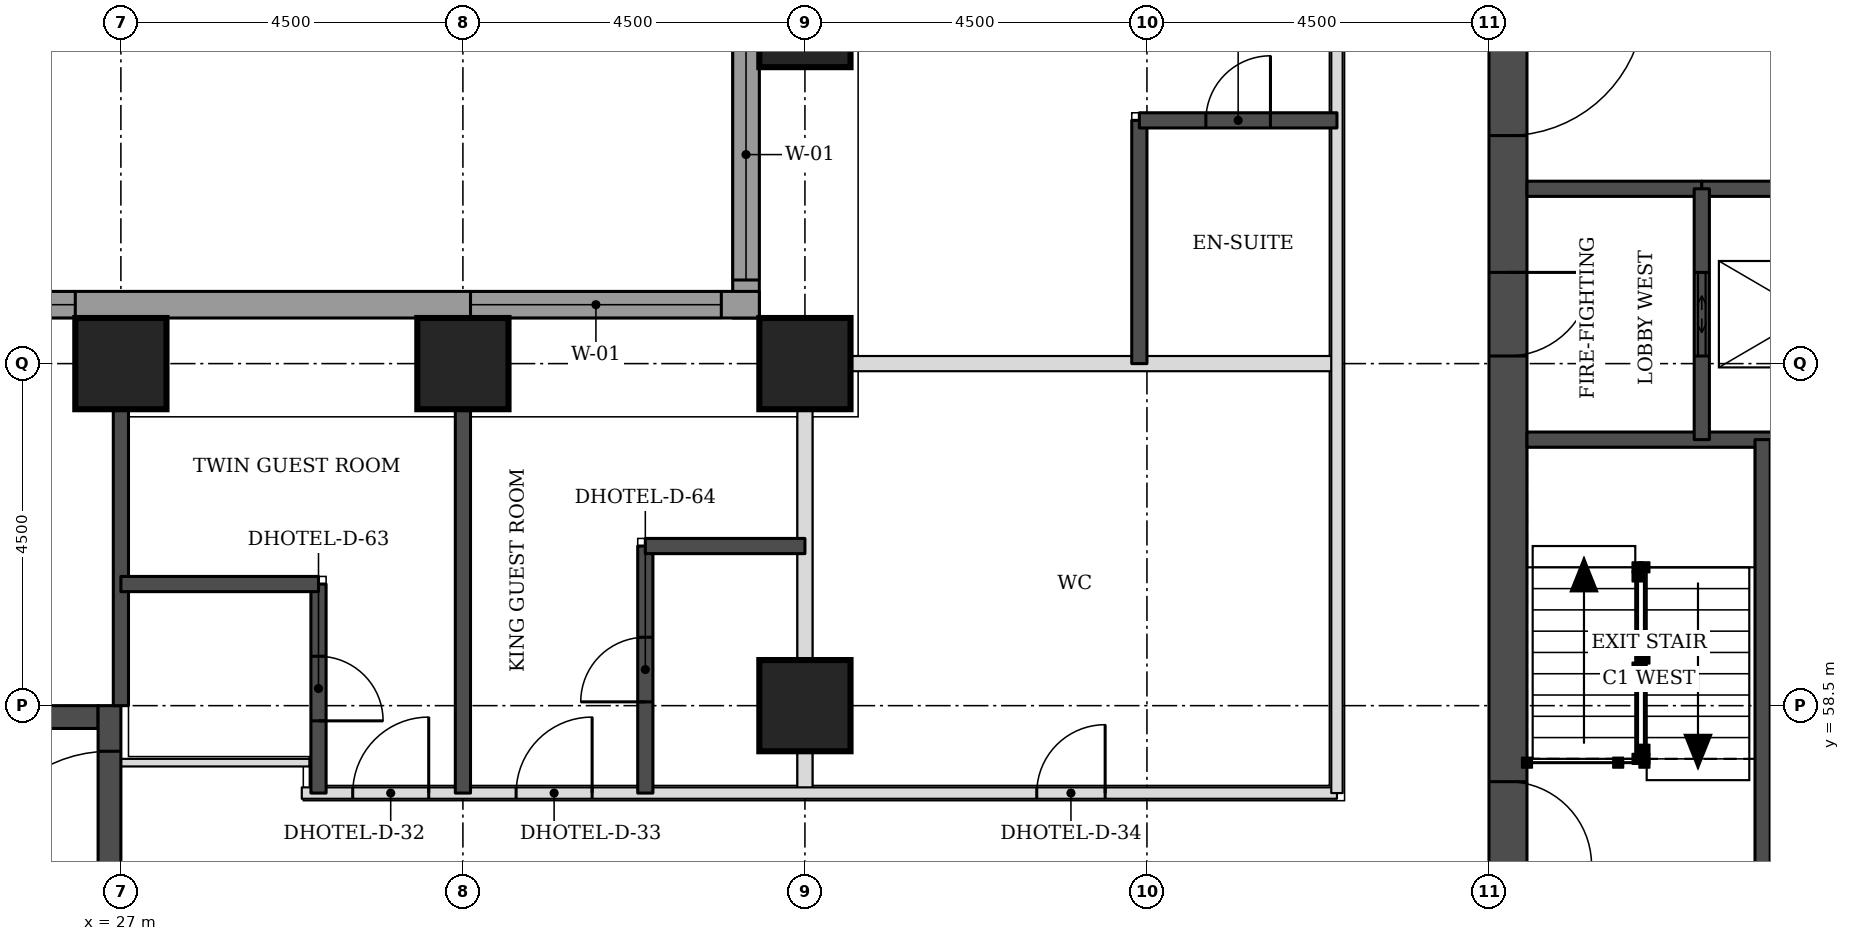
"""IFC4 building model, lengths in metres.
Left out: names, types, materials, properties, quantities, classifications, styles, units other than length and angle.
Written with IfcOpenShell. Run it as: python <this file> out.ifc"""

import sys

from ifc_helpers import new_model, si_unit, direction, frame, frame_2d, origin, origin_2d, place, context, subcontext, project, spatial, rectangle, extrude, element, fill, save


model = new_model("IFC4")
c1 = context("Model", 3, precision=1e-05, world=origin(), true_north=direction((0.0, 1.0)))
c2 = subcontext(c1, "Body", "Model", "MODEL_VIEW")
j1 = project(units=[si_unit("LENGTHUNIT", "METRE"), si_unit("PLANEANGLEUNIT", "RADIAN")], contexts=[c1])
p1 = place(None, origin())
s1 = spatial("IfcSite", under=j1, at=p1, CompositionType="ELEMENT")
p2 = place(p1, origin())
s2 = spatial("IfcBuilding", under=s1, at=p2, CompositionType="ELEMENT")
p3 = place(p2, frame((0.0, 0.0, 59.4)))
s3 = spatial("IfcBuildingStorey", under=s2, at=p3, CompositionType="ELEMENT", Elevation=59.4)
for number, where, z_axis, x_axis in (
    (1, (36.0, 58.5, 0.0), (0.0, 0.0, 1.0), (1.0, 0.0, 0.0)),
    (2, (27.0, 63.0, 0.0), (0.0, 0.0, 1.0), (1.0, 0.0, 0.0)),
    (3, (31.5, 63.0, 0.0), (0.0, 0.0, 1.0), (1.0, 0.0, 0.0)),
    (4, (36.0, 63.0, 0.0), (0.0, 0.0, 1.0), (1.0, 0.0, 0.0)),
    (5, (36.0, 67.5, 0.0), (0.0, 0.0, 1.0), (1.0, 0.0, 0.0)),
):
    element("IfcColumn", number, at=place(p3, frame(where, z_axis=z_axis, x_axis=x_axis)), inside=s3, PredefinedType="COLUMN", context=c2, shape_type="SweptSolid", body=[
        extrude(rectangle(XDim=1.2, YDim=1.2, at=origin_2d()), origin(), (0.0, 0.0, 1.0), 3.3),
    ])
p4 = place(p3, frame((45.25, 49.5, 0.0), z_axis=(0.0, 0.0, 1.0), x_axis=(0.0, 1.0, 0.0)))
e6 = element("IfcWall", 6, at=p4, inside=s3, PredefinedType="SHEAR", context=c2, shape_type="SweptSolid", body=[
    extrude(rectangle(XDim=22.5, YDim=0.5, at=frame_2d((11.25, 0.0))), origin(), (0.0, 0.0, 1.0), 3.3),
])
p5 = place(p4, frame((4.2, 0.0, 0.0)))
e7 = element("IfcOpeningElement", 7, at=p5, cuts=e6, PredefinedType="OPENING", context=c2, shape_type="SweptSolid", body=[
    extrude(rectangle(XDim=1.8, YDim=2.1, at=frame_2d((0.9, 1.05))), frame((0.0, 0.26, 0.0), z_axis=(0.0, -1.0, 0.0), x_axis=(1.0, 0.0, 0.0)), (0.0, 0.0, 1.0), 0.52),
])
p6 = place(p4, frame((6.9, 0.0, 0.0)))
e8 = element("IfcOpeningElement", 8, at=p6, cuts=e6, PredefinedType="OPENING", context=c2, shape_type="SweptSolid", body=[
    extrude(rectangle(XDim=1.1, YDim=2.1, at=frame_2d((0.55, 1.05))), frame((0.0, 0.26, 0.0), z_axis=(0.0, -1.0, 0.0), x_axis=(1.0, 0.0, 0.0)), (0.0, 0.0, 1.0), 0.52),
])
p7 = place(p4, frame((13.6, 0.0, 0.0)))
e9 = element("IfcOpeningElement", 9, at=p7, cuts=e6, PredefinedType="OPENING", context=c2, shape_type="SweptSolid", body=[
    extrude(rectangle(XDim=1.1, YDim=2.1, at=frame_2d((0.55, 1.05))), frame((0.0, 0.26, 0.0), z_axis=(0.0, -1.0, 0.0), x_axis=(1.0, 0.0, 0.0)), (0.0, 0.0, 1.0), 0.52),
])
p8 = place(p4, frame((16.5, 0.0, 0.0)))
e10 = element("IfcOpeningElement", 10, at=p8, cuts=e6, PredefinedType="OPENING", context=c2, shape_type="SweptSolid", body=[
    extrude(rectangle(XDim=1.8, YDim=2.1, at=frame_2d((0.9, 1.05))), frame((0.0, 0.26, 0.0), z_axis=(0.0, -1.0, 0.0), x_axis=(1.0, 0.0, 0.0)), (0.0, 0.0, 1.0), 0.52),
])
p9 = place(p3, frame((18.3, 58.35, 0.0), z_axis=(0.0, 0.0, 1.0), x_axis=(1.0, 0.0, 0.0)))
e11 = element("IfcWall", 11, at=p9, inside=s3, PredefinedType="SHEAR", context=c2, shape_type="SweptSolid", body=[
    extrude(rectangle(XDim=8.4, YDim=0.3, at=frame_2d((4.2, 0.0))), origin(), (0.0, 0.0, 1.0), 3.3),
])
p10 = place(p3, frame((26.85, 49.5, 0.0), z_axis=(0.0, 0.0, 1.0), x_axis=(0.0, 1.0, 0.0)))
e12 = element("IfcWall", 12, at=p10, inside=s3, PredefinedType="SHEAR", context=c2, shape_type="SweptSolid", body=[
    extrude(rectangle(XDim=9.0, YDim=0.3, at=frame_2d((4.5, 0.0))), origin(), (0.0, 0.0, 1.0), 3.3),
])
p11 = place(p10, frame((6.6, 0.0, 0.0)))
e13 = element("IfcOpeningElement", 13, at=p11, cuts=e12, PredefinedType="OPENING", context=c2, shape_type="SweptSolid", body=[
    extrude(rectangle(XDim=1.8, YDim=2.1, at=frame_2d((0.9, 1.05))), frame((0.0, 0.16, 0.0), z_axis=(0.0, -1.0, 0.0), x_axis=(1.0, 0.0, 0.0)), (0.0, 0.0, 1.0), 0.32),
])
p12 = place(p3, frame((35.225, 76.894, 0.0), z_axis=(0.0, 0.0, 1.0), x_axis=(0.0, -1.0, 0.0)))
e14 = element("IfcWall", 14, at=p12, inside=s3, PredefinedType="STANDARD", context=c2, shape_type="SweptSolid", body=[
    extrude(rectangle(XDim=13.293, YDim=0.35, at=frame_2d((6.647, 0.0))), origin(), (0.0, 0.0, 1.0), 3.055),
])
p13 = place(p12, frame((9.493, 0.0, 0.8)))
e15 = element("IfcOpeningElement", 15, at=p13, cuts=e14, PredefinedType="OPENING", context=c2, shape_type="SweptSolid", body=[
    extrude(rectangle(XDim=3.3, YDim=1.5, at=frame_2d((1.65, 0.75))), frame((0.0, 0.185, 0.0), z_axis=(0.0, -1.0, 0.0), x_axis=(1.0, 0.0, 0.0)), (0.0, 0.0, 1.0), 0.37),
])
p14 = place(p3, frame((35.4, 63.775, 0.0), z_axis=(0.0, 0.0, 1.0), x_axis=(-1.0, 0.0, 0.0)))
e16 = element("IfcWall", 16, at=p14, inside=s3, PredefinedType="STANDARD", context=c2, shape_type="SweptSolid", body=[
    extrude(rectangle(XDim=17.793, YDim=0.35, at=frame_2d((8.897, 0.0))), origin(), (0.0, 0.0, 1.0), 3.055),
])
p15 = place(p14, frame((0.5, 0.0, 0.8)))
e17 = element("IfcOpeningElement", 17, at=p15, cuts=e16, PredefinedType="OPENING", context=c2, shape_type="SweptSolid", body=[
    extrude(rectangle(XDim=3.3, YDim=1.5, at=frame_2d((1.65, 0.75))), frame((0.0, 0.185, 0.0), z_axis=(0.0, -1.0, 0.0), x_axis=(1.0, 0.0, 0.0)), (0.0, 0.0, 1.0), 0.37),
])
p16 = place(p14, frame((9.0, 0.0, 0.8)))
e18 = element("IfcOpeningElement", 18, at=p16, cuts=e16, PredefinedType="OPENING", context=c2, shape_type="SweptSolid", body=[
    extrude(rectangle(XDim=3.3, YDim=1.5, at=frame_2d((1.65, 0.75))), frame((0.0, 0.185, 0.0), z_axis=(0.0, -1.0, 0.0), x_axis=(1.0, 0.0, 0.0)), (0.0, 0.0, 1.0), 0.37),
])
p17 = place(p3, frame((36.0, 57.35, 0.0), z_axis=(0.0, 0.0, 1.0), x_axis=(0.0, 1.0, 0.0)))
e19 = element("IfcWall", 19, at=p17, inside=s3, PredefinedType="PARTITIONING", context=c2, shape_type="SweptSolid", body=[
    extrude(rectangle(XDim=5.05, YDim=0.2, at=frame_2d((2.525, 0.0))), origin(), (0.0, 0.0, 1.0), 2.33),
])
p18 = place(p3, frame((36.6, 63.0, 0.0), z_axis=(0.0, 0.0, 1.0), x_axis=(1.0, 0.0, 0.0)))
e20 = element("IfcWall", 20, at=p18, inside=s3, PredefinedType="PARTITIONING", context=c2, shape_type="SweptSolid", body=[
    extrude(rectangle(XDim=6.4, YDim=0.2, at=frame_2d((3.2, 0.0))), origin(), (0.0, 0.0, 1.0), 3.08),
])
p19 = place(p3, frame((29.38, 57.35, 0.0), z_axis=(0.0, 0.0, 1.0), x_axis=(1.0, 0.0, 0.0)))
e21 = element("IfcWall", 21, at=p19, inside=s3, PredefinedType="PARTITIONING", context=c2, shape_type="SweptSolid", body=[
    extrude(rectangle(XDim=13.62, YDim=0.15, at=frame_2d((6.81, 0.0))), origin(), (0.0, 0.0, 1.0), 3.08),
])
p20 = place(p19, frame((2.82, 0.0, 0.0)))
e22 = element("IfcOpeningElement", 22, at=p20, cuts=e21, PredefinedType="OPENING", context=c2, shape_type="SweptSolid", body=[
    extrude(rectangle(XDim=1.0, YDim=2.1, at=frame_2d((0.5, 1.05))), frame((0.0, 0.085, 0.0), z_axis=(0.0, -1.0, 0.0), x_axis=(1.0, 0.0, 0.0)), (0.0, 0.0, 1.0), 0.17),
])
p21 = place(p19, frame((0.67, 0.0, 0.0)))
e23 = element("IfcOpeningElement", 23, at=p21, cuts=e21, PredefinedType="OPENING", context=c2, shape_type="SweptSolid", body=[
    extrude(rectangle(XDim=1.0, YDim=2.1, at=frame_2d((0.5, 1.05))), frame((0.0, 0.085, 0.0), z_axis=(0.0, -1.0, 0.0), x_axis=(1.0, 0.0, 0.0)), (0.0, 0.0, 1.0), 0.17),
])
p22 = place(p19, frame((9.67, 0.0, 0.0)))
e24 = element("IfcOpeningElement", 24, at=p22, cuts=e21, PredefinedType="OPENING", context=c2, shape_type="SweptSolid", body=[
    extrude(rectangle(XDim=0.9, YDim=2.1, at=frame_2d((0.45, 1.05))), frame((0.0, 0.085, 0.0), z_axis=(0.0, -1.0, 0.0), x_axis=(1.0, 0.0, 0.0)), (0.0, 0.0, 1.0), 0.17),
])
p23 = place(p3, frame((43.0, 57.35, 0.0), z_axis=(0.0, 0.0, 1.0), x_axis=(0.0, 1.0, 0.0)))
e25 = element("IfcWall", 25, at=p23, inside=s3, PredefinedType="PARTITIONING", context=c2, shape_type="SweptSolid", body=[
    extrude(rectangle(XDim=16.65, YDim=0.15, at=frame_2d((8.325, 0.0))), origin(), (0.0, 0.0, 1.0), 3.08),
])
p24 = place(p23, frame((11.25, 0.0, 0.0)))
e26 = element("IfcOpeningElement", 26, at=p24, cuts=e25, PredefinedType="OPENING", context=c2, shape_type="SweptSolid", body=[
    extrude(rectangle(XDim=1.0, YDim=2.1, at=frame_2d((0.5, 1.05))), frame((0.0, 0.085, 0.0), z_axis=(0.0, -1.0, 0.0), x_axis=(1.0, 0.0, 0.0)), (0.0, 0.0, 1.0), 0.17),
])
p25 = place(p23, frame((15.203, 0.0, 0.0)))
e27 = element("IfcOpeningElement", 27, at=p25, cuts=e25, PredefinedType="OPENING", context=c2, shape_type="SweptSolid", body=[
    extrude(rectangle(XDim=1.0, YDim=2.1, at=frame_2d((0.5, 1.05))), frame((0.0, 0.085, 0.0), z_axis=(0.0, -1.0, 0.0), x_axis=(1.0, 0.0, 0.0)), (0.0, 0.0, 1.0), 0.17),
])
p26 = place(p3, frame((27.0, 58.5, 0.0), z_axis=(0.0, 0.0, 1.0), x_axis=(0.0, 1.0, 0.0)))
e28 = element("IfcWall", 28, at=p26, inside=s3, PredefinedType="SOLIDWALL", context=c2, shape_type="SweptSolid", body=[
    extrude(rectangle(XDim=3.9, YDim=0.2, at=frame_2d((1.95, 0.0))), origin(), (0.0, 0.0, 1.0), 3.08),
])
p27 = place(p3, frame((29.6, 57.35, 0.0), z_axis=(0.0, 0.0, 1.0), x_axis=(0.0, 1.0, 0.0)))
e29 = element("IfcWall", 29, at=p27, inside=s3, PredefinedType="SOLIDWALL", context=c2, shape_type="SweptSolid", body=[
    extrude(rectangle(XDim=2.75, YDim=0.2, at=frame_2d((1.375, 0.0))), origin(), (0.0, 0.0, 1.0), 3.08),
])
p28 = place(p27, frame((0.95, 0.0, 0.0)))
e30 = element("IfcOpeningElement", 30, at=p28, cuts=e29, PredefinedType="OPENING", context=c2, shape_type="SweptSolid", body=[
    extrude(rectangle(XDim=0.85, YDim=2.1, at=frame_2d((0.425, 1.05))), frame((0.0, 0.11, 0.0), z_axis=(0.0, -1.0, 0.0), x_axis=(1.0, 0.0, 0.0)), (0.0, 0.0, 1.0), 0.22),
])
p29 = place(p3, frame((31.5, 57.35, 0.0), z_axis=(0.0, 0.0, 1.0), x_axis=(0.0, 1.0, 0.0)))
e31 = element("IfcWall", 31, at=p29, inside=s3, PredefinedType="SOLIDWALL", context=c2, shape_type="SweptSolid", body=[
    extrude(rectangle(XDim=5.05, YDim=0.2, at=frame_2d((2.525, 0.0))), origin(), (0.0, 0.0, 1.0), 3.08),
])
p30 = place(p3, frame((33.9, 57.35, 0.0), z_axis=(0.0, 0.0, 1.0), x_axis=(0.0, 1.0, 0.0)))
e32 = element("IfcWall", 32, at=p30, inside=s3, PredefinedType="SOLIDWALL", context=c2, shape_type="SweptSolid", body=[
    extrude(rectangle(XDim=3.25, YDim=0.2, at=frame_2d((1.625, 0.0))), origin(), (0.0, 0.0, 1.0), 3.08),
])
p31 = place(p30, frame((1.2, 0.0, 0.0)))
e33 = element("IfcOpeningElement", 33, at=p31, cuts=e32, PredefinedType="OPENING", context=c2, shape_type="SweptSolid", body=[
    extrude(rectangle(XDim=0.85, YDim=2.1, at=frame_2d((0.425, 1.05))), frame((0.0, 0.11, 0.0), z_axis=(0.0, -1.0, 0.0), x_axis=(1.0, 0.0, 0.0)), (0.0, 0.0, 1.0), 0.22),
])
p32 = place(p3, frame((27.0, 60.1, 0.0), z_axis=(0.0, 0.0, 1.0), x_axis=(1.0, 0.0, 0.0)))
e34 = element("IfcWall", 34, at=p32, inside=s3, PredefinedType="SOLIDWALL", context=c2, shape_type="SweptSolid", body=[
    extrude(rectangle(XDim=2.6, YDim=0.2, at=frame_2d((1.3, 0.0))), origin(), (0.0, 0.0, 1.0), 3.08),
])
p33 = place(p3, frame((33.9, 60.6, 0.0), z_axis=(0.0, 0.0, 1.0), x_axis=(1.0, 0.0, 0.0)))
e35 = element("IfcWall", 35, at=p33, inside=s3, PredefinedType="SOLIDWALL", context=c2, shape_type="SweptSolid", body=[
    extrude(rectangle(XDim=2.1, YDim=0.2, at=frame_2d((1.05, 0.0))), origin(), (0.0, 0.0, 1.0), 3.08),
])
p34 = place(p3, frame((40.4, 63.0, 0.0), z_axis=(0.0, 0.0, 1.0), x_axis=(0.0, 1.0, 0.0)))
e36 = element("IfcWall", 36, at=p34, inside=s3, PredefinedType="SOLIDWALL", context=c2, shape_type="SweptSolid", body=[
    extrude(rectangle(XDim=3.2, YDim=0.2, at=frame_2d((1.6, 0.0))), origin(), (0.0, 0.0, 1.0), 3.08),
])
p35 = place(p3, frame((40.4, 66.2, 0.0), z_axis=(0.0, 0.0, 1.0), x_axis=(1.0, 0.0, 0.0)))
e37 = element("IfcWall", 37, at=p35, inside=s3, PredefinedType="SOLIDWALL", context=c2, shape_type="SweptSolid", body=[
    extrude(rectangle(XDim=2.6, YDim=0.2, at=frame_2d((1.3, 0.0))), origin(), (0.0, 0.0, 1.0), 3.08),
])
p36 = place(p35, frame((0.875, 0.0, 0.0)))
e38 = element("IfcOpeningElement", 38, at=p36, cuts=e37, PredefinedType="OPENING", context=c2, shape_type="SweptSolid", body=[
    extrude(rectangle(XDim=0.85, YDim=2.1, at=frame_2d((0.425, 1.05))), frame((0.0, 0.11, 0.0), z_axis=(0.0, -1.0, 0.0), x_axis=(1.0, 0.0, 0.0)), (0.0, 0.0, 1.0), 0.22),
])
p37 = place(p3, frame((27.0, 57.75, 0.0), z_axis=(0.0, 0.0, 1.0), x_axis=(1.0, 0.0, 0.0)))
e39 = element("IfcWall", 39, at=p37, inside=s3, PredefinedType="PARTITIONING", context=c2, shape_type="SweptSolid", body=[
    extrude(rectangle(XDim=2.48, YDim=0.1, at=frame_2d((1.24, 0.0))), origin(), (0.0, 0.0, 1.0), 3.08),
])
p38 = place(p3, frame((45.5, 62.0, 0.0), z_axis=(0.0, 0.0, 1.0), x_axis=(1.0, 0.0, 0.0)))
e40 = element("IfcWall", 40, at=p38, inside=s3, PredefinedType="SOLIDWALL", context=c2, shape_type="SweptSolid", body=[
    extrude(rectangle(XDim=5.15, YDim=0.2, at=frame_2d((2.575, 0.0))), origin(), (0.0, 0.0, 1.0), 3.08),
])
p39 = place(p3, frame((45.5, 65.3, 0.0), z_axis=(0.0, 0.0, 1.0), x_axis=(1.0, 0.0, 0.0)))
e41 = element("IfcWall", 41, at=p39, inside=s3, PredefinedType="SOLIDWALL", context=c2, shape_type="SweptSolid", body=[
    extrude(rectangle(XDim=2.3, YDim=0.2, at=frame_2d((1.15, 0.0))), origin(), (0.0, 0.0, 1.0), 3.08),
])
p40 = place(p3, frame((47.8, 65.3, 0.0), z_axis=(0.0, 0.0, 1.0), x_axis=(1.0, 0.0, 0.0)))
e42 = element("IfcWall", 42, at=p40, inside=s3, PredefinedType="SOLIDWALL", context=c2, shape_type="SweptSolid", body=[
    extrude(rectangle(XDim=16.9, YDim=0.2, at=frame_2d((8.45, 0.0))), origin(), (0.0, 0.0, 1.0), 3.08),
])
p41 = place(p3, frame((47.8, 62.0, 0.0), z_axis=(0.0, 0.0, 1.0), x_axis=(0.0, 1.0, 0.0)))
e43 = element("IfcWall", 43, at=p41, inside=s3, PredefinedType="SOLIDWALL", context=c2, shape_type="SweptSolid", body=[
    extrude(rectangle(XDim=3.3, YDim=0.2, at=frame_2d((1.65, 0.0))), origin(), (0.0, 0.0, 1.0), 3.08),
])
p42 = place(p41, frame((1.1, 0.0, 0.0)))
e44 = element("IfcOpeningElement", 44, at=p42, cuts=e43, PredefinedType="OPENING", context=c2, shape_type="SweptSolid", body=[
    extrude(rectangle(XDim=1.1, YDim=2.1, at=frame_2d((0.55, 1.05))), frame((0.0, 0.11, 0.0), z_axis=(0.0, -1.0, 0.0), x_axis=(1.0, 0.0, 0.0)), (0.0, 0.0, 1.0), 0.22),
])
p43 = place(p3, frame((48.6, 56.2, 0.0), z_axis=(0.0, 0.0, 1.0), x_axis=(0.0, 1.0, 0.0)))
e45 = element("IfcWall", 45, at=p43, inside=s3, PredefinedType="SOLIDWALL", context=c2, shape_type="SweptSolid", body=[
    extrude(rectangle(XDim=5.8, YDim=0.2, at=frame_2d((2.9, 0.0))), origin(), (0.0, 0.0, 1.0), 3.08),
])
p44 = place(p13, origin())
e46 = element("IfcWindow", 46, at=p44, inside=s3, PartitioningType="SINGLE_PANEL", PredefinedType="WINDOW", context=c2, shape_type="SweptSolid", body=[
    extrude(rectangle(XDim=3.3, YDim=1.5, at=frame_2d((1.65, 0.75))), frame((0.0, 0.085, 0.0), z_axis=(0.0, -1.0, 0.0), x_axis=(1.0, 0.0, 0.0)), (0.0, 0.0, 1.0), 0.06),
])
fill(e15, e46)
p45 = place(p15, origin())
e47 = element("IfcWindow", 47, at=p45, inside=s3, PartitioningType="SINGLE_PANEL", PredefinedType="WINDOW", context=c2, shape_type="SweptSolid", body=[
    extrude(rectangle(XDim=3.3, YDim=1.5, at=frame_2d((1.65, 0.75))), frame((0.0, 0.085, 0.0), z_axis=(0.0, -1.0, 0.0), x_axis=(1.0, 0.0, 0.0)), (0.0, 0.0, 1.0), 0.06),
])
fill(e17, e47)
p46 = place(p16, origin())
e48 = element("IfcWindow", 48, at=p46, inside=s3, PartitioningType="SINGLE_PANEL", PredefinedType="WINDOW", context=c2, shape_type="SweptSolid", body=[
    extrude(rectangle(XDim=3.3, YDim=1.5, at=frame_2d((1.65, 0.75))), frame((0.0, 0.085, 0.0), z_axis=(0.0, -1.0, 0.0), x_axis=(1.0, 0.0, 0.0)), (0.0, 0.0, 1.0), 0.06),
])
fill(e18, e48)
p47 = place(p20, origin())
e49 = element("IfcDoor", 49, at=p47, inside=s3, OperationType="SINGLE_SWING_RIGHT", PredefinedType="DOOR", context=c2, shape_type="SweptSolid", body=[
    extrude(rectangle(XDim=1.0, YDim=2.1, at=frame_2d((0.5, 1.05))), frame((0.0, 0.025, 0.0), z_axis=(0.0, -1.0, 0.0), x_axis=(1.0, 0.0, 0.0)), (0.0, 0.0, 1.0), 0.05),
])
fill(e22, e49)
p48 = place(p31, origin())
e50 = element("IfcDoor", 50, at=p48, inside=s3, OperationType="SINGLE_SWING_LEFT", PredefinedType="DOOR", context=c2, shape_type="SweptSolid", body=[
    extrude(rectangle(XDim=0.85, YDim=2.1, at=frame_2d((0.425, 1.05))), frame((0.0, 0.025, 0.0), z_axis=(0.0, -1.0, 0.0), x_axis=(1.0, 0.0, 0.0)), (0.0, 0.0, 1.0), 0.05),
])
fill(e33, e50)
p49 = place(p21, origin())
e51 = element("IfcDoor", 51, at=p49, inside=s3, OperationType="SINGLE_SWING_RIGHT", PredefinedType="DOOR", context=c2, shape_type="SweptSolid", body=[
    extrude(rectangle(XDim=1.0, YDim=2.1, at=frame_2d((0.5, 1.05))), frame((0.0, 0.025, 0.0), z_axis=(0.0, -1.0, 0.0), x_axis=(1.0, 0.0, 0.0)), (0.0, 0.0, 1.0), 0.05),
])
fill(e23, e51)
p50 = place(p28, frame((0.85, 0.0, 0.0), z_axis=(0.0, 0.0, 1.0), x_axis=(-1.0, 0.0, 0.0)))
e52 = element("IfcDoor", 52, at=p50, inside=s3, OperationType="SINGLE_SWING_RIGHT", PredefinedType="DOOR", context=c2, shape_type="SweptSolid", body=[
    extrude(rectangle(XDim=0.85, YDim=2.1, at=frame_2d((0.425, 1.05))), frame((0.0, 0.025, 0.0), z_axis=(0.0, -1.0, 0.0), x_axis=(1.0, 0.0, 0.0)), (0.0, 0.0, 1.0), 0.05),
])
fill(e30, e52)
p51 = place(p36, origin())
e53 = element("IfcDoor", 53, at=p51, inside=s3, OperationType="SINGLE_SWING_RIGHT", PredefinedType="DOOR", context=c2, shape_type="SweptSolid", body=[
    extrude(rectangle(XDim=0.85, YDim=2.1, at=frame_2d((0.425, 1.05))), frame((0.0, 0.025, 0.0), z_axis=(0.0, -1.0, 0.0), x_axis=(1.0, 0.0, 0.0)), (0.0, 0.0, 1.0), 0.05),
])
fill(e38, e53)
p52 = place(p22, origin())
e54 = element("IfcDoor", 54, at=p52, inside=s3, OperationType="SINGLE_SWING_RIGHT", PredefinedType="DOOR", context=c2, shape_type="SweptSolid", body=[
    extrude(rectangle(XDim=0.9, YDim=2.1, at=frame_2d((0.45, 1.05))), frame((0.0, 0.025, 0.0), z_axis=(0.0, -1.0, 0.0), x_axis=(1.0, 0.0, 0.0)), (0.0, 0.0, 1.0), 0.05),
])
fill(e24, e54)
p53 = place(p42, origin())
e55 = element("IfcDoor", 55, at=p53, inside=s3, OperationType="DOUBLE_DOOR_SLIDING", PredefinedType="DOOR", context=c2, shape_type="SweptSolid", body=[
    extrude(rectangle(XDim=1.1, YDim=2.1, at=frame_2d((0.55, 1.05))), frame((0.0, 0.025, 0.0), z_axis=(0.0, -1.0, 0.0), x_axis=(1.0, 0.0, 0.0)), (0.0, 0.0, 1.0), 0.05),
])
fill(e44, e55)
p54 = place(p6, frame((1.1, 0.0, 0.0), z_axis=(0.0, 0.0, 1.0), x_axis=(-1.0, 0.0, 0.0)))
e56 = element("IfcDoor", 56, at=p54, inside=s3, OperationType="SINGLE_SWING_RIGHT", PredefinedType="DOOR", context=c2, shape_type="SweptSolid", body=[
    extrude(rectangle(XDim=1.1, YDim=2.1, at=frame_2d((0.55, 1.05))), frame((0.0, 0.025, 0.0), z_axis=(0.0, -1.0, 0.0), x_axis=(1.0, 0.0, 0.0)), (0.0, 0.0, 1.0), 0.05),
])
fill(e8, e56)
p55 = place(p7, frame((1.1, 0.0, 0.0), z_axis=(0.0, 0.0, 1.0), x_axis=(-1.0, 0.0, 0.0)))
e57 = element("IfcDoor", 57, at=p55, inside=s3, OperationType="SINGLE_SWING_LEFT", PredefinedType="DOOR", context=c2, shape_type="SweptSolid", body=[
    extrude(rectangle(XDim=1.1, YDim=2.1, at=frame_2d((0.55, 1.05))), frame((0.0, 0.025, 0.0), z_axis=(0.0, -1.0, 0.0), x_axis=(1.0, 0.0, 0.0)), (0.0, 0.0, 1.0), 0.05),
])
fill(e9, e57)
p56 = place(p8, frame((1.8, 0.0, 0.0), z_axis=(0.0, 0.0, 1.0), x_axis=(-1.0, 0.0, 0.0)))
e58 = element("IfcDoor", 58, at=p56, inside=s3, OperationType="SINGLE_SWING_LEFT", PredefinedType="DOOR", context=c2, shape_type="SweptSolid", body=[
    extrude(rectangle(XDim=1.8, YDim=2.1, at=frame_2d((0.9, 1.05))), frame((0.0, 0.025, 0.0), z_axis=(0.0, -1.0, 0.0), x_axis=(1.0, 0.0, 0.0)), (0.0, 0.0, 1.0), 0.05),
])
fill(e10, e58)
p57 = place(p11, origin())
e59 = element("IfcDoor", 59, at=p57, inside=s3, OperationType="SINGLE_SWING_LEFT", PredefinedType="DOOR", context=c2, shape_type="SweptSolid", body=[
    extrude(rectangle(XDim=1.8, YDim=2.1, at=frame_2d((0.9, 1.05))), frame((0.0, 0.025, 0.0), z_axis=(0.0, -1.0, 0.0), x_axis=(1.0, 0.0, 0.0)), (0.0, 0.0, 1.0), 0.05),
])
fill(e13, e59)
save(model, sys.argv[1])
